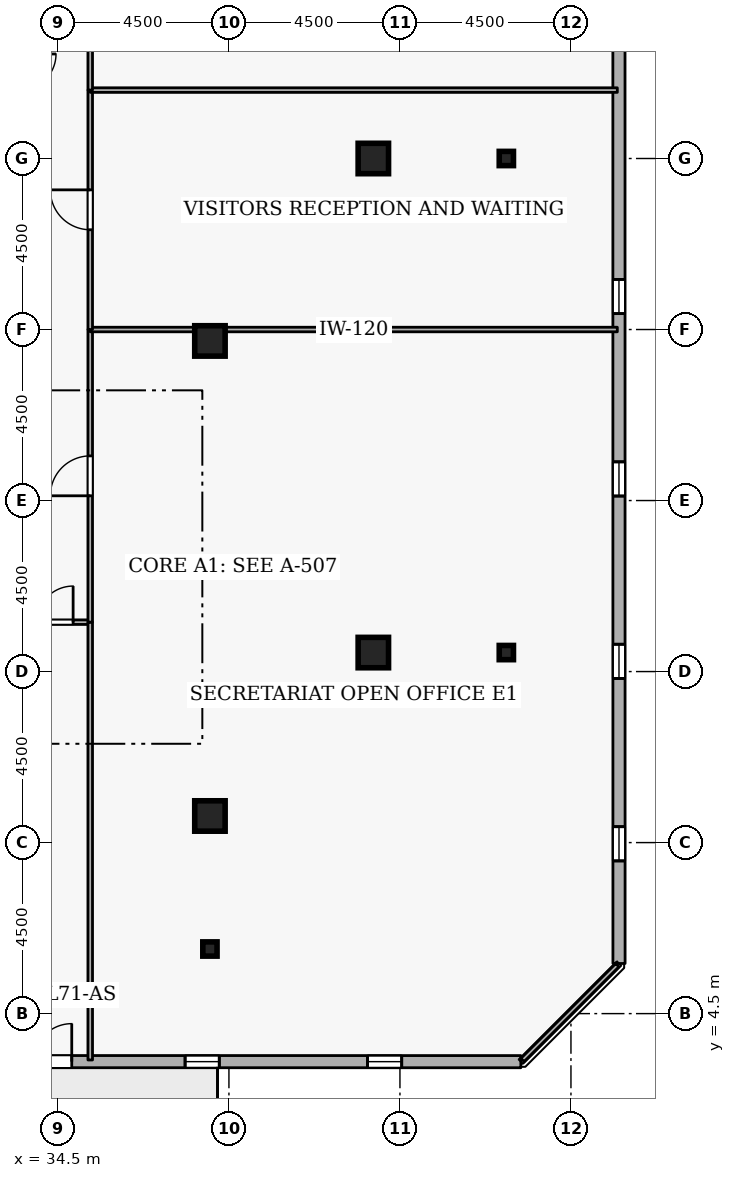
"""IFC4 building model, lengths in metres.
Left out: names, types, materials, properties, quantities, classifications, styles, units other than length and angle.
Written with IfcOpenShell. Run it as: python <this file> out.ifc"""

import sys

from ifc_helpers import new_model, si_unit, direction, frame, frame_2d, origin, origin_2d, place, context, subcontext, project, spatial, rectangle, i_section, extrude, element, fill, save


model = new_model("IFC4")
c1 = context("Model", 3, precision=1e-05, world=origin(), true_north=direction((0.0, 1.0)))
c2 = subcontext(c1, "Body", "Model", "MODEL_VIEW")
j1 = project(units=[si_unit("LENGTHUNIT", "METRE"), si_unit("PLANEANGLEUNIT", "RADIAN")], contexts=[c1])
p1 = place(None, origin())
s1 = spatial("IfcSite", under=j1, at=p1, CompositionType="ELEMENT")
p2 = place(p1, origin())
s2 = spatial("IfcBuilding", under=s1, at=p2, CompositionType="ELEMENT")
p3 = place(p2, frame((0.0, 0.0, 265.5)))
s3 = spatial("IfcBuildingStorey", under=s2, at=p3, CompositionType="ELEMENT", Elevation=265.5)
for number, where, z_axis, x_axis in (
    (1, (38.5, 9.7, 0.0), (0.0, 0.0, 1.0), (1.0, 0.0, 0.0)),
    (2, (42.8, 14.0, 0.0), (0.0, 0.0, 1.0), (1.0, 0.0, 0.0)),
    (3, (42.8, 27.0, 0.0), (0.0, 0.0, 1.0), (1.0, 0.0, 0.0)),
    (4, (38.5, 22.2, 0.0), (0.0, 0.0, 1.0), (1.0, 0.0, 0.0)),
):
    element("IfcColumn", number, at=place(p3, frame(where, z_axis=z_axis, x_axis=x_axis)), inside=s3, PredefinedType="COLUMN", context=c2, shape_type="SweptSolid", body=[
        extrude(rectangle(XDim=0.8, YDim=0.8, at=origin_2d()), origin(), (0.0, 0.0, 1.0), 3.6),
    ])
for number, where, z_axis, x_axis in (
    (5, (38.5, 6.2, 0.0), (0.0, 0.0, 1.0), (1.0, 0.0, 0.0)),
    (6, (46.3, 14.0, 0.0), (0.0, 0.0, 1.0), (1.0, 0.0, 0.0)),
    (7, (46.3, 27.0, 0.0), (0.0, 0.0, 1.0), (1.0, 0.0, 0.0)),
):
    element("IfcColumn", number, at=place(p3, frame(where, z_axis=z_axis, x_axis=x_axis)), inside=s3, PredefinedType="COLUMN", context=c2, shape_type="SweptSolid", body=[
        extrude(i_section(OverallWidth=0.375, OverallDepth=0.375, WebThickness=0.017, FlangeThickness=0.027, FilletRadius=0.015, at=origin_2d()), origin(), (0.0, 0.0, 1.0), 3.6),
    ])
p4 = place(p3, frame((11.146, 3.238, 0.0), z_axis=(0.0, 0.0, 1.0), x_axis=(0.999999997144, -7.5574884e-05, 0.0)))
e8 = element("IfcWall", 8, at=p4, inside=s3, PredefinedType="STANDARD", context=c2, shape_type="SweptSolid", body=[
    extrude(rectangle(XDim=35.535, YDim=0.32, at=frame_2d((17.768, 0.0))), origin(), (0.0, 0.0, 1.0), 2.7),
])
p5 = place(p4, frame((22.718, 0.0, 0.0)))
e9 = element("IfcOpeningElement", 9, at=p5, cuts=e8, PredefinedType="OPENING", context=c2, shape_type="SweptSolid", body=[
    extrude(rectangle(XDim=1.0, YDim=2.08, at=frame_2d((0.5, 1.04))), frame((0.0, 0.17, 0.0), z_axis=(0.0, -1.0, 0.0), x_axis=(1.0, 0.0, 0.0)), (0.0, 0.0, 1.0), 0.34),
])
p6 = place(p4, frame((2.7, 0.0, 0.72)))
e10 = element("IfcOpeningElement", 10, at=p6, cuts=e8, PredefinedType="OPENING", context=c2, shape_type="SweptSolid", body=[
    extrude(rectangle(XDim=0.9, YDim=1.75, at=frame_2d((0.45, 0.875))), frame((0.0, 0.17, 0.0), z_axis=(0.0, -1.0, 0.0), x_axis=(1.0, 0.0, 0.0)), (0.0, 0.0, 1.0), 0.34),
])
p7 = place(p4, frame((7.5, 0.0, 0.72)))
e11 = element("IfcOpeningElement", 11, at=p7, cuts=e8, PredefinedType="OPENING", context=c2, shape_type="SweptSolid", body=[
    extrude(rectangle(XDim=0.9, YDim=1.75, at=frame_2d((0.45, 0.875))), frame((0.0, 0.17, 0.0), z_axis=(0.0, -1.0, 0.0), x_axis=(1.0, 0.0, 0.0)), (0.0, 0.0, 1.0), 0.34),
])
p8 = place(p4, frame((12.3, 0.0, 0.72)))
e12 = element("IfcOpeningElement", 12, at=p8, cuts=e8, PredefinedType="OPENING", context=c2, shape_type="SweptSolid", body=[
    extrude(rectangle(XDim=0.9, YDim=1.75, at=frame_2d((0.45, 0.875))), frame((0.0, 0.17, 0.0), z_axis=(0.0, -1.0, 0.0), x_axis=(1.0, 0.0, 0.0)), (0.0, 0.0, 1.0), 0.34),
])
p9 = place(p4, frame((17.1, 0.0, 0.72)))
e13 = element("IfcOpeningElement", 13, at=p9, cuts=e8, PredefinedType="OPENING", context=c2, shape_type="SweptSolid", body=[
    extrude(rectangle(XDim=0.9, YDim=1.75, at=frame_2d((0.45, 0.875))), frame((0.0, 0.17, 0.0), z_axis=(0.0, -1.0, 0.0), x_axis=(1.0, 0.0, 0.0)), (0.0, 0.0, 1.0), 0.34),
])
p10 = place(p4, frame((26.7, 0.0, 0.72)))
e14 = element("IfcOpeningElement", 14, at=p10, cuts=e8, PredefinedType="OPENING", context=c2, shape_type="SweptSolid", body=[
    extrude(rectangle(XDim=0.9, YDim=1.75, at=frame_2d((0.45, 0.875))), frame((0.0, 0.17, 0.0), z_axis=(0.0, -1.0, 0.0), x_axis=(1.0, 0.0, 0.0)), (0.0, 0.0, 1.0), 0.34),
])
p11 = place(p4, frame((31.5, 0.0, 0.72)))
e15 = element("IfcOpeningElement", 15, at=p11, cuts=e8, PredefinedType="OPENING", context=c2, shape_type="SweptSolid", body=[
    extrude(rectangle(XDim=0.9, YDim=1.75, at=frame_2d((0.45, 0.875))), frame((0.0, 0.17, 0.0), z_axis=(0.0, -1.0, 0.0), x_axis=(1.0, 0.0, 0.0)), (0.0, 0.0, 1.0), 0.34),
])
p12 = place(p3, frame((49.265, 5.819, 0.0), z_axis=(0.0, 0.0, 1.0), x_axis=(-7.5574884e-05, 0.999999997144, 0.0)))
e16 = element("IfcWall", 16, at=p12, inside=s3, PredefinedType="STANDARD", context=c2, shape_type="SweptSolid", body=[
    extrude(rectangle(XDim=35.535, YDim=0.32, at=frame_2d((17.768, 0.0))), origin(), (0.0, 0.0, 1.0), 2.7),
])
p13 = place(p12, frame((2.7, 0.0, 0.72)))
e17 = element("IfcOpeningElement", 17, at=p13, cuts=e16, PredefinedType="OPENING", context=c2, shape_type="SweptSolid", body=[
    extrude(rectangle(XDim=0.9, YDim=1.75, at=frame_2d((0.45, 0.875))), frame((0.0, 0.17, 0.0), z_axis=(0.0, -1.0, 0.0), x_axis=(1.0, 0.0, 0.0)), (0.0, 0.0, 1.0), 0.34),
])
p14 = place(p12, frame((7.5, 0.0, 0.72)))
e18 = element("IfcOpeningElement", 18, at=p14, cuts=e16, PredefinedType="OPENING", context=c2, shape_type="SweptSolid", body=[
    extrude(rectangle(XDim=0.9, YDim=1.75, at=frame_2d((0.45, 0.875))), frame((0.0, 0.17, 0.0), z_axis=(0.0, -1.0, 0.0), x_axis=(1.0, 0.0, 0.0)), (0.0, 0.0, 1.0), 0.34),
])
p15 = place(p12, frame((12.3, 0.0, 0.72)))
e19 = element("IfcOpeningElement", 19, at=p15, cuts=e16, PredefinedType="OPENING", context=c2, shape_type="SweptSolid", body=[
    extrude(rectangle(XDim=0.9, YDim=1.75, at=frame_2d((0.45, 0.875))), frame((0.0, 0.17, 0.0), z_axis=(0.0, -1.0, 0.0), x_axis=(1.0, 0.0, 0.0)), (0.0, 0.0, 1.0), 0.34),
])
p16 = place(p12, frame((17.1, 0.0, 0.72)))
e20 = element("IfcOpeningElement", 20, at=p16, cuts=e16, PredefinedType="OPENING", context=c2, shape_type="SweptSolid", body=[
    extrude(rectangle(XDim=0.9, YDim=1.75, at=frame_2d((0.45, 0.875))), frame((0.0, 0.17, 0.0), z_axis=(0.0, -1.0, 0.0), x_axis=(1.0, 0.0, 0.0)), (0.0, 0.0, 1.0), 0.34),
])
p17 = place(p12, frame((26.7, 0.0, 0.72)))
e21 = element("IfcOpeningElement", 21, at=p17, cuts=e16, PredefinedType="OPENING", context=c2, shape_type="SweptSolid", body=[
    extrude(rectangle(XDim=0.9, YDim=1.75, at=frame_2d((0.45, 0.875))), frame((0.0, 0.17, 0.0), z_axis=(0.0, -1.0, 0.0), x_axis=(1.0, 0.0, 0.0)), (0.0, 0.0, 1.0), 0.34),
])
p18 = place(p12, frame((31.5, 0.0, 0.72)))
e22 = element("IfcOpeningElement", 22, at=p18, cuts=e16, PredefinedType="OPENING", context=c2, shape_type="SweptSolid", body=[
    extrude(rectangle(XDim=0.9, YDim=1.75, at=frame_2d((0.45, 0.875))), frame((0.0, 0.17, 0.0), z_axis=(0.0, -1.0, 0.0), x_axis=(1.0, 0.0, 0.0)), (0.0, 0.0, 1.0), 0.34),
])
p19 = place(p3, frame((33.5, 14.8, 0.0), z_axis=(0.0, 0.0, 1.0), x_axis=(1.0, 0.0, 0.0)))
e23 = element("IfcWall", 23, at=p19, inside=s3, PredefinedType="PARTITIONING", context=c2, shape_type="SweptSolid", body=[
    extrude(rectangle(XDim=1.85, YDim=0.12, at=frame_2d((0.925, 0.0))), origin(), (0.0, 0.0, 1.0), 3.34),
])
p20 = place(p19, frame((0.45, 0.0, 0.0)))
e24 = element("IfcOpeningElement", 24, at=p20, cuts=e23, PredefinedType="OPENING", context=c2, shape_type="SweptSolid", body=[
    extrude(rectangle(XDim=0.95, YDim=2.1, at=frame_2d((0.475, 1.05))), frame((0.0, 0.07, 0.0), z_axis=(0.0, -1.0, 0.0), x_axis=(1.0, 0.0, 0.0)), (0.0, 0.0, 1.0), 0.14),
])
p21 = place(p3, frame((35.35, 14.8, 0.0), z_axis=(0.0, 0.0, 1.0), x_axis=(0.0, -1.0, 0.0)))
e25 = element("IfcWall", 25, at=p21, inside=s3, PredefinedType="PARTITIONING", context=c2, shape_type="SweptSolid", body=[
    extrude(rectangle(XDim=11.52, YDim=0.12, at=frame_2d((5.76, 0.0))), origin(), (0.0, 0.0, 1.0), 3.34),
])
p22 = place(p3, frame((35.35, 14.8, 0.0), z_axis=(0.0, 0.0, 1.0), x_axis=(0.0, 1.0, 0.0)))
e26 = element("IfcWall", 26, at=p22, inside=s3, PredefinedType="PARTITIONING", context=c2, shape_type="SweptSolid", body=[
    extrude(rectangle(XDim=7.7, YDim=0.12, at=frame_2d((3.85, 0.0))), origin(), (0.0, 0.0, 1.0), 3.34),
])
p23 = place(p22, frame((3.325, 0.0, 0.0)))
e27 = element("IfcOpeningElement", 27, at=p23, cuts=e26, PredefinedType="OPENING", context=c2, shape_type="SweptSolid", body=[
    extrude(rectangle(XDim=1.05, YDim=2.1, at=frame_2d((0.525, 1.05))), frame((0.0, 0.07, 0.0), z_axis=(0.0, -1.0, 0.0), x_axis=(1.0, 0.0, 0.0)), (0.0, 0.0, 1.0), 0.14),
])
p24 = place(p3, frame((35.35, 22.5, 0.0), z_axis=(0.0, 0.0, 1.0), x_axis=(1.0, 0.0, 0.0)))
e28 = element("IfcWall", 28, at=p24, inside=s3, PredefinedType="PARTITIONING", context=c2, shape_type="SweptSolid", body=[
    extrude(rectangle(XDim=13.87, YDim=0.12, at=frame_2d((6.935, 0.0))), origin(), (0.0, 0.0, 1.0), 3.34),
])
p25 = place(p3, frame((49.22, 5.775, 0.0), z_axis=(0.0, 0.0, 1.0), x_axis=(-0.707106781187, -0.707106781187, 0.0)))
e29 = element("IfcWall", 29, at=p25, inside=s3, PredefinedType="PARTITIONING", context=c2, shape_type="SweptSolid", body=[
    extrude(rectangle(XDim=3.528, YDim=0.12, at=frame_2d((1.764, 0.0))), origin(), (0.0, 0.0, 1.0), 3.34),
])
p26 = place(p3, frame((35.35, 22.5, 0.0), z_axis=(0.0, 0.0, 1.0), x_axis=(0.0, 1.0, 0.0)))
e30 = element("IfcWall", 30, at=p26, inside=s3, PredefinedType="PARTITIONING", context=c2, shape_type="SweptSolid", body=[
    extrude(rectangle(XDim=6.3, YDim=0.12, at=frame_2d((3.15, 0.0))), origin(), (0.0, 0.0, 1.0), 3.34),
])
p27 = place(p26, frame((2.625, 0.0, 0.0)))
e31 = element("IfcOpeningElement", 31, at=p27, cuts=e30, PredefinedType="OPENING", context=c2, shape_type="SweptSolid", body=[
    extrude(rectangle(XDim=1.05, YDim=2.1, at=frame_2d((0.525, 1.05))), frame((0.0, 0.07, 0.0), z_axis=(0.0, -1.0, 0.0), x_axis=(1.0, 0.0, 0.0)), (0.0, 0.0, 1.0), 0.14),
])
p28 = place(p3, frame((35.35, 28.8, 0.0), z_axis=(0.0, 0.0, 1.0), x_axis=(1.0, 0.0, 0.0)))
e32 = element("IfcWall", 32, at=p28, inside=s3, PredefinedType="PARTITIONING", context=c2, shape_type="SweptSolid", body=[
    extrude(rectangle(XDim=13.87, YDim=0.12, at=frame_2d((6.935, 0.0))), origin(), (0.0, 0.0, 1.0), 3.34),
])
p29 = place(p3, frame((35.35, 28.8, 0.0), z_axis=(0.0, 0.0, 1.0), x_axis=(0.0, 1.0, 0.0)))
e33 = element("IfcWall", 33, at=p29, inside=s3, PredefinedType="PARTITIONING", context=c2, shape_type="SweptSolid", body=[
    extrude(rectangle(XDim=4.5, YDim=0.12, at=frame_2d((2.25, 0.0))), origin(), (0.0, 0.0, 1.0), 3.34),
])
p30 = place(p29, frame((1.725, 0.0, 0.0)))
e34 = element("IfcOpeningElement", 34, at=p30, cuts=e33, PredefinedType="OPENING", context=c2, shape_type="SweptSolid", body=[
    extrude(rectangle(XDim=1.05, YDim=2.1, at=frame_2d((0.525, 1.05))), frame((0.0, 0.07, 0.0), z_axis=(0.0, -1.0, 0.0), x_axis=(1.0, 0.0, 0.0)), (0.0, 0.0, 1.0), 0.14),
])
p31 = place(p5, origin())
e35 = element("IfcDoor", 35, at=p31, inside=s3, OperationType="SINGLE_SWING_RIGHT", PredefinedType="DOOR", context=c2, shape_type="SweptSolid", body=[
    extrude(rectangle(XDim=1.0, YDim=2.08, at=frame_2d((0.5, 1.04))), frame((0.0, 0.025, 0.0), z_axis=(0.0, -1.0, 0.0), x_axis=(1.0, 0.0, 0.0)), (0.0, 0.0, 1.0), 0.05),
])
fill(e9, e35)
p32 = place(p10, origin())
e36 = element("IfcWindow", 36, at=p32, inside=s3, PartitioningType="SINGLE_PANEL", PredefinedType="WINDOW", context=c2, shape_type="SweptSolid", body=[
    extrude(rectangle(XDim=0.9, YDim=1.75, at=frame_2d((0.45, 0.875))), frame((0.0, 0.03, 0.0), z_axis=(0.0, -1.0, 0.0), x_axis=(1.0, 0.0, 0.0)), (0.0, 0.0, 1.0), 0.06),
])
fill(e14, e36)
p33 = place(p11, origin())
e37 = element("IfcWindow", 37, at=p33, inside=s3, PartitioningType="SINGLE_PANEL", PredefinedType="WINDOW", context=c2, shape_type="SweptSolid", body=[
    extrude(rectangle(XDim=0.9, YDim=1.75, at=frame_2d((0.45, 0.875))), frame((0.0, 0.03, 0.0), z_axis=(0.0, -1.0, 0.0), x_axis=(1.0, 0.0, 0.0)), (0.0, 0.0, 1.0), 0.06),
])
fill(e15, e37)
p34 = place(p13, origin())
e38 = element("IfcWindow", 38, at=p34, inside=s3, PartitioningType="SINGLE_PANEL", PredefinedType="WINDOW", context=c2, shape_type="SweptSolid", body=[
    extrude(rectangle(XDim=0.9, YDim=1.75, at=frame_2d((0.45, 0.875))), frame((0.0, 0.03, 0.0), z_axis=(0.0, -1.0, 0.0), x_axis=(1.0, 0.0, 0.0)), (0.0, 0.0, 1.0), 0.06),
])
fill(e17, e38)
p35 = place(p14, origin())
e39 = element("IfcWindow", 39, at=p35, inside=s3, PartitioningType="SINGLE_PANEL", PredefinedType="WINDOW", context=c2, shape_type="SweptSolid", body=[
    extrude(rectangle(XDim=0.9, YDim=1.75, at=frame_2d((0.45, 0.875))), frame((0.0, 0.03, 0.0), z_axis=(0.0, -1.0, 0.0), x_axis=(1.0, 0.0, 0.0)), (0.0, 0.0, 1.0), 0.06),
])
fill(e18, e39)
p36 = place(p15, origin())
e40 = element("IfcWindow", 40, at=p36, inside=s3, PartitioningType="SINGLE_PANEL", PredefinedType="WINDOW", context=c2, shape_type="SweptSolid", body=[
    extrude(rectangle(XDim=0.9, YDim=1.75, at=frame_2d((0.45, 0.875))), frame((0.0, 0.03, 0.0), z_axis=(0.0, -1.0, 0.0), x_axis=(1.0, 0.0, 0.0)), (0.0, 0.0, 1.0), 0.06),
])
fill(e19, e40)
p37 = place(p16, origin())
e41 = element("IfcWindow", 41, at=p37, inside=s3, PartitioningType="SINGLE_PANEL", PredefinedType="WINDOW", context=c2, shape_type="SweptSolid", body=[
    extrude(rectangle(XDim=0.9, YDim=1.75, at=frame_2d((0.45, 0.875))), frame((0.0, 0.03, 0.0), z_axis=(0.0, -1.0, 0.0), x_axis=(1.0, 0.0, 0.0)), (0.0, 0.0, 1.0), 0.06),
])
fill(e20, e41)
p38 = place(p20, origin())
e42 = element("IfcDoor", 42, at=p38, inside=s3, OperationType="SINGLE_SWING_RIGHT", PredefinedType="DOOR", context=c2, shape_type="SweptSolid", body=[
    extrude(rectangle(XDim=0.95, YDim=2.1, at=frame_2d((0.475, 1.05))), frame((0.0, 0.025, 0.0), z_axis=(0.0, -1.0, 0.0), x_axis=(1.0, 0.0, 0.0)), (0.0, 0.0, 1.0), 0.05),
])
fill(e24, e42)
p39 = place(p23, origin())
e43 = element("IfcDoor", 43, at=p39, inside=s3, OperationType="SINGLE_SWING_LEFT", PredefinedType="DOOR", context=c2, shape_type="SweptSolid", body=[
    extrude(rectangle(XDim=1.05, YDim=2.1, at=frame_2d((0.525, 1.05))), frame((0.0, 0.025, 0.0), z_axis=(0.0, -1.0, 0.0), x_axis=(1.0, 0.0, 0.0)), (0.0, 0.0, 1.0), 0.05),
])
fill(e27, e43)
p40 = place(p27, origin())
e44 = element("IfcDoor", 44, at=p40, inside=s3, OperationType="SINGLE_SWING_RIGHT", PredefinedType="DOOR", context=c2, shape_type="SweptSolid", body=[
    extrude(rectangle(XDim=1.05, YDim=2.1, at=frame_2d((0.525, 1.05))), frame((0.0, 0.025, 0.0), z_axis=(0.0, -1.0, 0.0), x_axis=(1.0, 0.0, 0.0)), (0.0, 0.0, 1.0), 0.05),
])
fill(e31, e44)
save(model, sys.argv[1])
